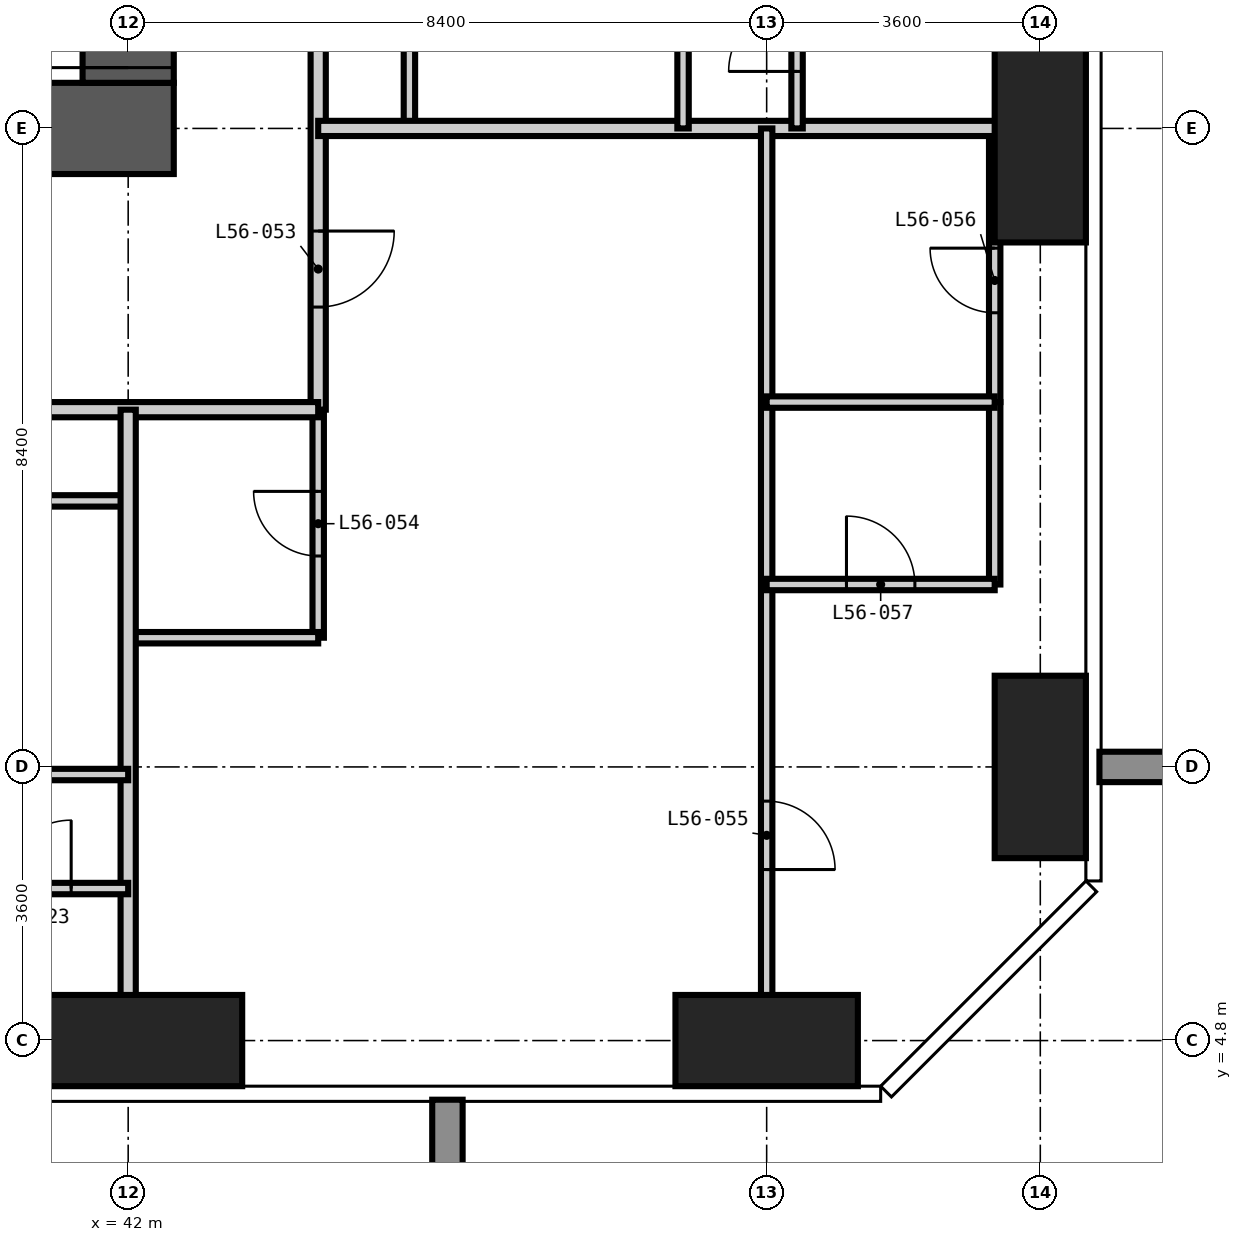
"""IFC4 building model, lengths in metres.
Left out: names, types, materials, properties, quantities, classifications, styles, units other than length and angle.
Written with IfcOpenShell. Run it as: python <this file> out.ifc"""

import sys

from ifc_helpers import new_model, si_unit, direction, frame, frame_2d, origin, origin_2d, place, context, subcontext, project, spatial, rectangle, extrude, element, fill, save


model = new_model("IFC4")
c1 = context("Model", 3, precision=1e-05, world=origin(), true_north=direction((0.0, 1.0)))
c2 = subcontext(c1, "Body", "Model", "MODEL_VIEW")
j1 = project(units=[si_unit("LENGTHUNIT", "METRE"), si_unit("PLANEANGLEUNIT", "RADIAN")], contexts=[c1])
p1 = place(None, origin())
s1 = spatial("IfcSite", under=j1, at=p1, CompositionType="ELEMENT")
p2 = place(p1, origin())
s2 = spatial("IfcBuilding", under=s1, at=p2, CompositionType="ELEMENT")
p3 = place(p2, frame((0.0, 0.0, 216.6)))
s3 = spatial("IfcBuildingStorey", under=s2, at=p3, CompositionType="ELEMENT", Elevation=216.6)
p4 = place(p3, frame((42.0, 4.8, -0.35), z_axis=(0.0, 0.0, 1.0), x_axis=(1.0, 0.0, 0.0)))
e1 = element("IfcColumn", 1, at=p4, inside=s3, PredefinedType="COLUMN", context=c2, shape_type="SweptSolid", body=[
    extrude(rectangle(XDim=3.0, YDim=1.2, at=origin_2d()), origin(), (0.0, 0.0, 1.0), 3.55),
])
p5 = place(p3, frame((50.4, 4.8, -0.35), z_axis=(0.0, 0.0, 1.0), x_axis=(1.0, 0.0, 0.0)))
e2 = element("IfcColumn", 2, at=p5, inside=s3, PredefinedType="COLUMN", context=c2, shape_type="SweptSolid", body=[
    extrude(rectangle(XDim=2.4, YDim=1.2, at=origin_2d()), origin(), (0.0, 0.0, 1.0), 3.55),
])
p6 = place(p3, frame((54.0, 8.4, -0.35), z_axis=(0.0, 0.0, 1.0), x_axis=(1.0, 0.0, 0.0)))
e3 = element("IfcColumn", 3, at=p6, inside=s3, PredefinedType="COLUMN", context=c2, shape_type="SweptSolid", body=[
    extrude(rectangle(XDim=1.2, YDim=2.4, at=origin_2d()), origin(), (0.0, 0.0, 1.0), 3.55),
])
p7 = place(p3, frame((54.0, 16.8, -0.35), z_axis=(0.0, 0.0, 1.0), x_axis=(1.0, 0.0, 0.0)))
e4 = element("IfcColumn", 4, at=p7, inside=s3, PredefinedType="COLUMN", context=c2, shape_type="SweptSolid", body=[
    extrude(rectangle(XDim=1.2, YDim=3.0, at=origin_2d()), origin(), (0.0, 0.0, 1.0), 3.55),
])
p8 = place(p3, frame((16.2, 16.8, -0.35), z_axis=(0.0, 0.0, 1.0), x_axis=(1.0, 0.0, 0.0)))
e5 = element("IfcWall", 5, at=p8, inside=s3, PredefinedType="SHEAR", context=c2, shape_type="SweptSolid", body=[
    extrude(rectangle(XDim=26.4, YDim=1.2, at=frame_2d((13.2, 0.0))), origin(), (0.0, 0.0, 1.0), 3.55),
])
p9 = place(p8, frame((12.7, 0.0, 0.35)))
e6 = element("IfcOpeningElement", 6, at=p9, cuts=e5, PredefinedType="OPENING", context=c2, shape_type="SweptSolid", body=[
    extrude(rectangle(XDim=1.0, YDim=2.1, at=frame_2d((0.5, 1.05))), frame((0.0, 0.61, 0.0), z_axis=(0.0, -1.0, 0.0), x_axis=(1.0, 0.0, 0.0)), (0.0, 0.0, 1.0), 1.22),
])
p10 = place(p8, frame((19.0, 0.0, 0.35)))
e7 = element("IfcOpeningElement", 7, at=p10, cuts=e5, PredefinedType="OPENING", context=c2, shape_type="SweptSolid", body=[
    extrude(rectangle(XDim=1.0, YDim=2.1, at=frame_2d((0.5, 1.05))), frame((0.0, 0.61, 0.0), z_axis=(0.0, -1.0, 0.0), x_axis=(1.0, 0.0, 0.0)), (0.0, 0.0, 1.0), 1.22),
])
p11 = place(p3, frame((42.0, 17.4, -0.35), z_axis=(0.0, 0.0, 1.0), x_axis=(0.0, 1.0, 0.0)))
e8 = element("IfcWall", 8, at=p11, inside=s3, PredefinedType="SHEAR", context=c2, shape_type="SweptSolid", body=[
    extrude(rectangle(XDim=24.0, YDim=1.2, at=frame_2d((12.0, 0.0))), origin(), (0.0, 0.0, 1.0), 3.55),
])
p12 = place(p11, frame((0.2, 0.0, 0.35)))
e9 = element("IfcOpeningElement", 9, at=p12, cuts=e8, PredefinedType="OPENING", context=c2, shape_type="SweptSolid", body=[
    extrude(rectangle(XDim=1.2, YDim=2.2, at=frame_2d((0.6, 1.1))), frame((0.0, 0.61, 0.0), z_axis=(0.0, -1.0, 0.0), x_axis=(1.0, 0.0, 0.0)), (0.0, 0.0, 1.0), 1.22),
])
p13 = place(p11, frame((11.5, 0.0, 0.35)))
e10 = element("IfcOpeningElement", 10, at=p13, cuts=e8, PredefinedType="OPENING", context=c2, shape_type="SweptSolid", body=[
    extrude(rectangle(XDim=1.0, YDim=2.1, at=frame_2d((0.5, 1.05))), frame((0.0, 0.61, 0.0), z_axis=(0.0, -1.0, 0.0), x_axis=(1.0, 0.0, 0.0)), (0.0, 0.0, 1.0), 1.22),
])
p14 = place(p11, frame((19.9, 0.0, 0.35)))
e11 = element("IfcOpeningElement", 11, at=p14, cuts=e8, PredefinedType="OPENING", context=c2, shape_type="SweptSolid", body=[
    extrude(rectangle(XDim=1.0, YDim=2.1, at=frame_2d((0.5, 1.05))), frame((0.0, 0.61, 0.0), z_axis=(0.0, -1.0, 0.0), x_axis=(1.0, 0.0, 0.0)), (0.0, 0.0, 1.0), 1.22),
])
p15 = place(p3, frame((44.5, 10.1, 0.0), z_axis=(0.0, 0.0, 1.0), x_axis=(0.0, 1.0, 0.0)))
e12 = element("IfcWall", 12, at=p15, inside=s3, PredefinedType="PARTITIONING", context=c2, shape_type="SweptSolid", body=[
    extrude(rectangle(XDim=3.0, YDim=0.15, at=frame_2d((1.5, 0.0))), origin(), (0.0, 0.0, 1.0), 3.2),
])
p16 = place(p15, frame((1.075, 0.0, 0.0)))
e13 = element("IfcOpeningElement", 13, at=p16, cuts=e12, PredefinedType="OPENING", context=c2, shape_type="SweptSolid", body=[
    extrude(rectangle(XDim=0.85, YDim=2.1, at=frame_2d((0.425, 1.05))), frame((0.0, 0.085, 0.0), z_axis=(0.0, -1.0, 0.0), x_axis=(1.0, 0.0, 0.0)), (0.0, 0.0, 1.0), 0.17),
])
p17 = place(p3, frame((45.7, 16.8, 0.0), z_axis=(0.0, 0.0, 1.0), x_axis=(0.0, 1.0, 0.0)))
e14 = element("IfcWall", 14, at=p17, inside=s3, PredefinedType="PARTITIONING", context=c2, shape_type="SweptSolid", body=[
    extrude(rectangle(XDim=2.4, YDim=0.15, at=frame_2d((1.2, 0.0))), origin(), (0.0, 0.0, 1.0), 3.2),
])
p18 = place(p3, frame((53.4, 13.2, 0.0), z_axis=(0.0, 0.0, 1.0), x_axis=(0.0, 1.0, 0.0)))
e15 = element("IfcWall", 15, at=p18, inside=s3, PredefinedType="PARTITIONING", context=c2, shape_type="SweptSolid", body=[
    extrude(rectangle(XDim=3.6, YDim=0.15, at=frame_2d((1.8, 0.0))), origin(), (0.0, 0.0, 1.0), 3.2),
])
p19 = place(p18, frame((1.175, 0.0, 0.0)))
e16 = element("IfcOpeningElement", 16, at=p19, cuts=e15, PredefinedType="OPENING", context=c2, shape_type="SweptSolid", body=[
    extrude(rectangle(XDim=0.85, YDim=2.1, at=frame_2d((0.425, 1.05))), frame((0.0, 0.085, 0.0), z_axis=(0.0, -1.0, 0.0), x_axis=(1.0, 0.0, 0.0)), (0.0, 0.0, 1.0), 0.17),
])
p20 = place(p3, frame((42.0, 10.1, 0.0), z_axis=(0.0, 0.0, 1.0), x_axis=(1.0, 0.0, 0.0)))
e17 = element("IfcWall", 17, at=p20, inside=s3, PredefinedType="PARTITIONING", context=c2, shape_type="SweptSolid", body=[
    extrude(rectangle(XDim=2.5, YDim=0.15, at=frame_2d((1.25, 0.0))), origin(), (0.0, 0.0, 1.0), 3.2),
])
p21 = place(p3, frame((39.6, 11.9, 0.0), z_axis=(0.0, 0.0, 1.0), x_axis=(1.0, 0.0, 0.0)))
e18 = element("IfcWall", 18, at=p21, inside=s3, PredefinedType="PARTITIONING", context=c2, shape_type="SweptSolid", body=[
    extrude(rectangle(XDim=2.4, YDim=0.15, at=frame_2d((1.2, 0.0))), origin(), (0.0, 0.0, 1.0), 3.2),
])
p22 = place(p3, frame((44.5, 45.1, 0.0), z_axis=(0.0, 0.0, 1.0), x_axis=(0.0, -1.0, 0.0)))
e19 = element("IfcWall", 19, at=p22, inside=s3, PredefinedType="PARTITIONING", context=c2, shape_type="SweptSolid", body=[
    extrude(rectangle(XDim=32.0, YDim=0.2, at=frame_2d((16.0, 0.0))), origin(), (0.0, 0.0, 1.0), 3.2),
])
p23 = place(p22, frame((25.7, 0.0, 0.0)))
e20 = element("IfcOpeningElement", 20, at=p23, cuts=e19, PredefinedType="OPENING", context=c2, shape_type="SweptSolid", body=[
    extrude(rectangle(XDim=1.0, YDim=2.2, at=frame_2d((0.5, 1.1))), frame((0.0, 0.11, 0.0), z_axis=(0.0, -1.0, 0.0), x_axis=(1.0, 0.0, 0.0)), (0.0, 0.0, 1.0), 0.22),
])
p24 = place(p22, frame((19.4, 0.0, 0.0)))
e21 = element("IfcOpeningElement", 21, at=p24, cuts=e19, PredefinedType="OPENING", context=c2, shape_type="SweptSolid", body=[
    extrude(rectangle(XDim=1.0, YDim=2.2, at=frame_2d((0.5, 1.1))), frame((0.0, 0.11, 0.0), z_axis=(0.0, -1.0, 0.0), x_axis=(1.0, 0.0, 0.0)), (0.0, 0.0, 1.0), 0.22),
])
p25 = place(p22, frame((11.0, 0.0, 0.0)))
e22 = element("IfcOpeningElement", 22, at=p25, cuts=e19, PredefinedType="OPENING", context=c2, shape_type="SweptSolid", body=[
    extrude(rectangle(XDim=1.0, YDim=2.2, at=frame_2d((0.5, 1.1))), frame((0.0, 0.11, 0.0), z_axis=(0.0, -1.0, 0.0), x_axis=(1.0, 0.0, 0.0)), (0.0, 0.0, 1.0), 0.22),
])
p26 = place(p22, frame((4.7, 0.0, 0.0)))
e23 = element("IfcOpeningElement", 23, at=p26, cuts=e19, PredefinedType="OPENING", context=c2, shape_type="SweptSolid", body=[
    extrude(rectangle(XDim=1.0, YDim=2.2, at=frame_2d((0.5, 1.1))), frame((0.0, 0.11, 0.0), z_axis=(0.0, -1.0, 0.0), x_axis=(1.0, 0.0, 0.0)), (0.0, 0.0, 1.0), 0.22),
])
p27 = place(p22, frame((29.65, 0.0, 0.0)))
e24 = element("IfcOpeningElement", 24, at=p27, cuts=e19, PredefinedType="OPENING", context=c2, shape_type="SweptSolid", body=[
    extrude(rectangle(XDim=1.0, YDim=2.2, at=frame_2d((0.5, 1.1))), frame((0.0, 0.11, 0.0), z_axis=(0.0, -1.0, 0.0), x_axis=(1.0, 0.0, 0.0)), (0.0, 0.0, 1.0), 0.22),
])
p28 = place(p22, frame((1.05, 0.0, 0.0)))
e25 = element("IfcOpeningElement", 25, at=p28, cuts=e19, PredefinedType="OPENING", context=c2, shape_type="SweptSolid", body=[
    extrude(rectangle(XDim=1.0, YDim=2.2, at=frame_2d((0.5, 1.1))), frame((0.0, 0.11, 0.0), z_axis=(0.0, -1.0, 0.0), x_axis=(1.0, 0.0, 0.0)), (0.0, 0.0, 1.0), 0.22),
])
p29 = place(p3, frame((44.5, 13.1, 0.0), z_axis=(0.0, 0.0, 1.0), x_axis=(-1.0, 0.0, 0.0)))
e26 = element("IfcWall", 26, at=p29, inside=s3, PredefinedType="PARTITIONING", context=c2, shape_type="SweptSolid", body=[
    extrude(rectangle(XDim=31.4, YDim=0.2, at=frame_2d((15.7, 0.0))), origin(), (0.0, 0.0, 1.0), 3.2),
])
p30 = place(p29, frame((24.2, 0.0, 0.0)))
e27 = element("IfcOpeningElement", 27, at=p30, cuts=e26, PredefinedType="OPENING", context=c2, shape_type="SweptSolid", body=[
    extrude(rectangle(XDim=1.0, YDim=2.2, at=frame_2d((0.5, 1.1))), frame((0.0, 0.11, 0.0), z_axis=(0.0, -1.0, 0.0), x_axis=(1.0, 0.0, 0.0)), (0.0, 0.0, 1.0), 0.22),
])
p31 = place(p29, frame((13.4, 0.0, 0.0)))
e28 = element("IfcOpeningElement", 28, at=p31, cuts=e26, PredefinedType="OPENING", context=c2, shape_type="SweptSolid", body=[
    extrude(rectangle(XDim=1.0, YDim=2.2, at=frame_2d((0.5, 1.1))), frame((0.0, 0.11, 0.0), z_axis=(0.0, -1.0, 0.0), x_axis=(1.0, 0.0, 0.0)), (0.0, 0.0, 1.0), 0.22),
])
p32 = place(p29, frame((7.4, 0.0, 0.0)))
e29 = element("IfcOpeningElement", 29, at=p32, cuts=e26, PredefinedType="OPENING", context=c2, shape_type="SweptSolid", body=[
    extrude(rectangle(XDim=1.0, YDim=2.2, at=frame_2d((0.5, 1.1))), frame((0.0, 0.11, 0.0), z_axis=(0.0, -1.0, 0.0), x_axis=(1.0, 0.0, 0.0)), (0.0, 0.0, 1.0), 0.22),
])
p33 = place(p3, frame((42.0, 4.182, 0.0), z_axis=(0.0, 0.0, 1.0), x_axis=(0.0, 1.0, 0.0)))
e30 = element("IfcWall", 30, at=p33, inside=s3, PredefinedType="PARTITIONING", context=c2, shape_type="SweptSolid", body=[
    extrude(rectangle(XDim=8.918, YDim=0.2, at=frame_2d((4.459, 0.0))), origin(), (0.0, 0.0, 1.0), 3.2),
])
p34 = place(p3, frame((44.5, 16.8, 0.0), z_axis=(0.0, 0.0, 1.0), x_axis=(1.0, 0.0, 0.0)))
e31 = element("IfcWall", 31, at=p34, inside=s3, PredefinedType="PARTITIONING", context=c2, shape_type="SweptSolid", body=[
    extrude(rectangle(XDim=10.118, YDim=0.2, at=frame_2d((5.059, 0.0))), origin(), (0.0, 0.0, 1.0), 3.2),
])
p35 = place(p3, frame((49.3, 16.8, 0.0), z_axis=(0.0, 0.0, 1.0), x_axis=(0.0, 1.0, 0.0)))
e32 = element("IfcWall", 32, at=p35, inside=s3, PredefinedType="PARTITIONING", context=c2, shape_type="SweptSolid", body=[
    extrude(rectangle(XDim=2.4, YDim=0.15, at=frame_2d((1.2, 0.0))), origin(), (0.0, 0.0, 1.0), 3.2),
])
p36 = place(p3, frame((50.4, 4.182, 0.0), z_axis=(0.0, 0.0, 1.0), x_axis=(0.0, 1.0, 0.0)))
e33 = element("IfcWall", 33, at=p36, inside=s3, PredefinedType="PARTITIONING", context=c2, shape_type="SweptSolid", body=[
    extrude(rectangle(XDim=12.618, YDim=0.15, at=frame_2d((6.309, 0.0))), origin(), (0.0, 0.0, 1.0), 3.2),
])
p37 = place(p36, frame((2.868, 0.0, 0.0)))
e34 = element("IfcOpeningElement", 34, at=p37, cuts=e33, PredefinedType="OPENING", context=c2, shape_type="SweptSolid", body=[
    extrude(rectangle(XDim=0.9, YDim=2.1, at=frame_2d((0.45, 1.05))), frame((0.0, 0.085, 0.0), z_axis=(0.0, -1.0, 0.0), x_axis=(1.0, 0.0, 0.0)), (0.0, 0.0, 1.0), 0.17),
])
p38 = place(p3, frame((50.8, 16.8, 0.0), z_axis=(0.0, 0.0, 1.0), x_axis=(0.0, 1.0, 0.0)))
e35 = element("IfcWall", 35, at=p38, inside=s3, PredefinedType="PARTITIONING", context=c2, shape_type="SweptSolid", body=[
    extrude(rectangle(XDim=2.4, YDim=0.15, at=frame_2d((1.2, 0.0))), origin(), (0.0, 0.0, 1.0), 3.2),
])
p39 = place(p38, frame((0.75, 0.0, 0.0)))
e36 = element("IfcOpeningElement", 36, at=p39, cuts=e35, PredefinedType="OPENING", context=c2, shape_type="SweptSolid", body=[
    extrude(rectangle(XDim=0.9, YDim=2.1, at=frame_2d((0.45, 1.05))), frame((0.0, 0.085, 0.0), z_axis=(0.0, -1.0, 0.0), x_axis=(1.0, 0.0, 0.0)), (0.0, 0.0, 1.0), 0.17),
])
p40 = place(p3, frame((53.4, 10.8, 0.0), z_axis=(0.0, 0.0, 1.0), x_axis=(0.0, 1.0, 0.0)))
e37 = element("IfcWall", 37, at=p40, inside=s3, PredefinedType="PARTITIONING", context=c2, shape_type="SweptSolid", body=[
    extrude(rectangle(XDim=2.4, YDim=0.15, at=frame_2d((1.2, 0.0))), origin(), (0.0, 0.0, 1.0), 3.2),
])
p41 = place(p3, frame((39.6, 6.8, 0.0), z_axis=(0.0, 0.0, 1.0), x_axis=(1.0, 0.0, 0.0)))
e38 = element("IfcWall", 38, at=p41, inside=s3, PredefinedType="PARTITIONING", context=c2, shape_type="SweptSolid", body=[
    extrude(rectangle(XDim=2.4, YDim=0.15, at=frame_2d((1.2, 0.0))), origin(), (0.0, 0.0, 1.0), 3.2),
])
p42 = place(p41, frame((0.75, 0.0, 0.0)))
e39 = element("IfcOpeningElement", 39, at=p42, cuts=e38, PredefinedType="OPENING", context=c2, shape_type="SweptSolid", body=[
    extrude(rectangle(XDim=0.9, YDim=2.1, at=frame_2d((0.45, 1.05))), frame((0.0, 0.085, 0.0), z_axis=(0.0, -1.0, 0.0), x_axis=(1.0, 0.0, 0.0)), (0.0, 0.0, 1.0), 0.17),
])
p43 = place(p3, frame((39.6, 8.3, 0.0), z_axis=(0.0, 0.0, 1.0), x_axis=(1.0, 0.0, 0.0)))
e40 = element("IfcWall", 40, at=p43, inside=s3, PredefinedType="PARTITIONING", context=c2, shape_type="SweptSolid", body=[
    extrude(rectangle(XDim=2.4, YDim=0.15, at=frame_2d((1.2, 0.0))), origin(), (0.0, 0.0, 1.0), 3.2),
])
p44 = place(p3, frame((50.4, 10.8, 0.0), z_axis=(0.0, 0.0, 1.0), x_axis=(1.0, 0.0, 0.0)))
e41 = element("IfcWall", 41, at=p44, inside=s3, PredefinedType="PARTITIONING", context=c2, shape_type="SweptSolid", body=[
    extrude(rectangle(XDim=3.0, YDim=0.15, at=frame_2d((1.5, 0.0))), origin(), (0.0, 0.0, 1.0), 3.2),
])
p45 = place(p44, frame((1.05, 0.0, 0.0)))
e42 = element("IfcOpeningElement", 42, at=p45, cuts=e41, PredefinedType="OPENING", context=c2, shape_type="SweptSolid", body=[
    extrude(rectangle(XDim=0.9, YDim=2.1, at=frame_2d((0.45, 1.05))), frame((0.0, 0.085, 0.0), z_axis=(0.0, -1.0, 0.0), x_axis=(1.0, 0.0, 0.0)), (0.0, 0.0, 1.0), 0.17),
])
p46 = place(p3, frame((50.4, 13.2, 0.0), z_axis=(0.0, 0.0, 1.0), x_axis=(1.0, 0.0, 0.0)))
e43 = element("IfcWall", 43, at=p46, inside=s3, PredefinedType="PARTITIONING", context=c2, shape_type="SweptSolid", body=[
    extrude(rectangle(XDim=3.0, YDim=0.15, at=frame_2d((1.5, 0.0))), origin(), (0.0, 0.0, 1.0), 3.2),
])
p47 = place(p12, origin())
e44 = element("IfcDoor", 44, at=p47, inside=s3, OperationType="SINGLE_SWING_LEFT", PredefinedType="DOOR", context=c2, shape_type="SweptSolid", body=[
    extrude(rectangle(XDim=1.2, YDim=2.2, at=frame_2d((0.6, 1.1))), frame((0.0, 0.025, 0.0), z_axis=(0.0, -1.0, 0.0), x_axis=(1.0, 0.0, 0.0)), (0.0, 0.0, 1.0), 0.05),
])
fill(e9, e44)
p48 = place(p42, origin())
e45 = element("IfcDoor", 45, at=p48, inside=s3, OperationType="SINGLE_SWING_RIGHT", PredefinedType="DOOR", context=c2, shape_type="SweptSolid", body=[
    extrude(rectangle(XDim=0.9, YDim=2.1, at=frame_2d((0.45, 1.05))), frame((0.0, 0.025, 0.0), z_axis=(0.0, -1.0, 0.0), x_axis=(1.0, 0.0, 0.0)), (0.0, 0.0, 1.0), 0.05),
])
fill(e39, e45)
p49 = place(p39, origin())
e46 = element("IfcDoor", 46, at=p49, inside=s3, OperationType="SINGLE_SWING_LEFT", PredefinedType="DOOR", context=c2, shape_type="SweptSolid", body=[
    extrude(rectangle(XDim=0.9, YDim=2.1, at=frame_2d((0.45, 1.05))), frame((0.0, 0.025, 0.0), z_axis=(0.0, -1.0, 0.0), x_axis=(1.0, 0.0, 0.0)), (0.0, 0.0, 1.0), 0.05),
])
fill(e36, e46)
p50 = place(p27, origin())
e47 = element("IfcDoor", 47, at=p50, inside=s3, OperationType="SINGLE_SWING_LEFT", PredefinedType="DOOR", context=c2, shape_type="SweptSolid", body=[
    extrude(rectangle(XDim=1.0, YDim=2.2, at=frame_2d((0.5, 1.1))), frame((0.0, 0.025, 0.0), z_axis=(0.0, -1.0, 0.0), x_axis=(1.0, 0.0, 0.0)), (0.0, 0.0, 1.0), 0.05),
])
fill(e24, e47)
p51 = place(p16, origin())
e48 = element("IfcDoor", 48, at=p51, inside=s3, OperationType="SINGLE_SWING_RIGHT", PredefinedType="DOOR", context=c2, shape_type="SweptSolid", body=[
    extrude(rectangle(XDim=0.85, YDim=2.1, at=frame_2d((0.425, 1.05))), frame((0.0, 0.025, 0.0), z_axis=(0.0, -1.0, 0.0), x_axis=(1.0, 0.0, 0.0)), (0.0, 0.0, 1.0), 0.05),
])
fill(e13, e48)
p52 = place(p37, frame((0.9, 0.0, 0.0), z_axis=(0.0, 0.0, 1.0), x_axis=(-1.0, 0.0, 0.0)))
e49 = element("IfcDoor", 49, at=p52, inside=s3, OperationType="SINGLE_SWING_RIGHT", PredefinedType="DOOR", context=c2, shape_type="SweptSolid", body=[
    extrude(rectangle(XDim=0.9, YDim=2.1, at=frame_2d((0.45, 1.05))), frame((0.0, 0.025, 0.0), z_axis=(0.0, -1.0, 0.0), x_axis=(1.0, 0.0, 0.0)), (0.0, 0.0, 1.0), 0.05),
])
fill(e34, e49)
p53 = place(p19, origin())
e50 = element("IfcDoor", 50, at=p53, inside=s3, OperationType="SINGLE_SWING_RIGHT", PredefinedType="DOOR", context=c2, shape_type="SweptSolid", body=[
    extrude(rectangle(XDim=0.85, YDim=2.1, at=frame_2d((0.425, 1.05))), frame((0.0, 0.025, 0.0), z_axis=(0.0, -1.0, 0.0), x_axis=(1.0, 0.0, 0.0)), (0.0, 0.0, 1.0), 0.05),
])
fill(e16, e50)
p54 = place(p45, origin())
e51 = element("IfcDoor", 51, at=p54, inside=s3, OperationType="SINGLE_SWING_LEFT", PredefinedType="DOOR", context=c2, shape_type="SweptSolid", body=[
    extrude(rectangle(XDim=0.9, YDim=2.1, at=frame_2d((0.45, 1.05))), frame((0.0, 0.025, 0.0), z_axis=(0.0, -1.0, 0.0), x_axis=(1.0, 0.0, 0.0)), (0.0, 0.0, 1.0), 0.05),
])
fill(e42, e51)
save(model, sys.argv[1])
